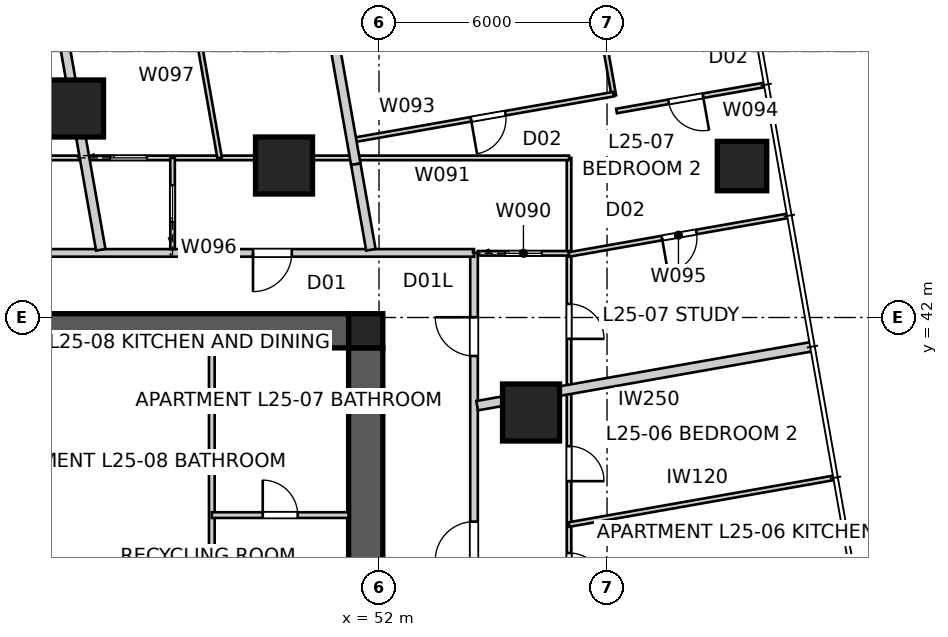
"""IFC4 building model, lengths in metres.
Left out: names, types, materials, properties, quantities, classifications, styles, units other than length and angle.
Written with IfcOpenShell. Run it as: python <this file> out.ifc"""

import sys

from ifc_helpers import new_model, si_unit, direction, frame, frame_2d, origin, origin_2d, place, context, subcontext, project, spatial, polyline, rectangle, outline, extrude, element, fill, save


model = new_model("IFC4")
c1 = context("Model", 3, precision=1e-05, world=origin(), true_north=direction((0.0, 1.0)))
c2 = subcontext(c1, "Body", "Model", "MODEL_VIEW")
j1 = project(units=[si_unit("LENGTHUNIT", "METRE"), si_unit("PLANEANGLEUNIT", "RADIAN")], contexts=[c1])
p1 = place(None, origin())
s1 = spatial("IfcSite", under=j1, at=p1, CompositionType="ELEMENT")
p2 = place(p1, origin())
s2 = spatial("IfcBuilding", under=s1, at=p2, CompositionType="ELEMENT")
p3 = place(p2, frame((0.0, 0.0, 93.0)))
s3 = spatial("IfcBuildingStorey", under=s2, at=p3, CompositionType="ELEMENT", Elevation=93.0)
p4 = place(p3, frame((28.8, 41.65, 0.0), z_axis=(0.0, 0.0, 1.0), x_axis=(1.0, 0.0, 0.0)))
e1 = element("IfcWall", 1, at=p4, inside=s3, PredefinedType="SHEAR", context=c2, shape_type="SweptSolid", body=[
    extrude(outline(polyline([(0.0, -0.45), (22.4, -0.45), (22.4, -0.025), (22.85, -0.025), (22.85, 0.025), (22.4, 0.025), (22.4, 0.45), (0.0, 0.45), (0.0, 0.025), (-0.45, 0.025), (-0.45, -0.025), (0.0, -0.025), (0.0, -0.45)])), origin(), (0.0, 0.0, 1.0), 3.4),
])
p5 = place(p3, frame((51.65, 18.8, 0.0), z_axis=(0.0, 0.0, 1.0), x_axis=(0.0, 1.0, 0.0)))
e2 = element("IfcWall", 2, at=p5, inside=s3, PredefinedType="SHEAR", context=c2, shape_type="SweptSolid", body=[
    extrude(outline(polyline([(0.0, -0.45), (22.4, -0.45), (22.4, -0.025), (22.85, -0.025), (22.85, 0.025), (22.4, 0.025), (22.4, 0.45), (0.0, 0.45), (0.0, 0.025), (-0.45, 0.025), (-0.45, -0.025), (0.0, -0.025), (0.0, -0.45)])), origin(), (0.0, 0.0, 1.0), 3.4),
])
p6 = place(p5, frame((11.14, 0.0, 0.0)))
e3 = element("IfcOpeningElement", 3, at=p6, cuts=e2, PredefinedType="OPENING", context=c2, shape_type="SweptSolid", body=[
    extrude(rectangle(XDim=1.02, YDim=2.4, at=frame_2d((0.51, 1.2))), frame((0.0, 0.46, 0.0), z_axis=(0.0, -1.0, 0.0), x_axis=(1.0, 0.0, 0.0)), (0.0, 0.0, 1.0), 0.92),
])
p7 = place(p3, frame((51.65, 41.65, 0.0), z_axis=(0.0, 0.0, 1.0), x_axis=(1.0, 0.0, 0.0)))
e4 = element("IfcColumn", 4, at=p7, inside=s3, PredefinedType="COLUMN", context=c2, shape_type="SweptSolid", body=[
    extrude(rectangle(XDim=0.9, YDim=0.9, at=origin_2d()), origin(), (0.0, 0.0, 1.0), 3.4),
])
p8 = place(p3, frame((61.552, 45.985, 0.0), z_axis=(0.0, 0.0, 1.0), x_axis=(1.0, 0.0, 0.0)))
e5 = element("IfcColumn", 5, at=p8, inside=s3, PredefinedType="COLUMN", context=c2, shape_type="SweptSolid", body=[
    extrude(rectangle(XDim=1.3, YDim=1.3, at=origin_2d()), origin(), (0.0, 0.0, 1.0), 3.4),
])
for number, where, z_axis, x_axis in (
    (6, (56.0, 39.5, 0.0), (0.0, 0.0, 1.0), (1.0, 0.0, 0.0)),
    (7, (49.5, 46.0, 0.0), (0.0, 0.0, 1.0), (1.0, 0.0, 0.0)),
    (8, (44.0, 47.5, 0.0), (0.0, 0.0, 1.0), (1.0, 0.0, 0.0)),
):
    element("IfcColumn", number, at=place(p3, frame(where, z_axis=z_axis, x_axis=x_axis)), inside=s3, PredefinedType="COLUMN", context=c2, shape_type="SweptSolid", body=[
        extrude(rectangle(XDim=1.5, YDim=1.5, at=origin_2d()), origin(), (0.0, 0.0, 1.0), 3.4),
    ])
p9 = place(p3, frame((54.5, 16.3, 0.0), z_axis=(0.0, 0.0, 1.0), x_axis=(0.0, 1.0, 0.0)))
e9 = element("IfcWall", 9, at=p9, inside=s3, PredefinedType="PARTITIONING", context=c2, shape_type="SweptSolid", body=[
    extrude(rectangle(XDim=27.4, YDim=0.2, at=frame_2d((13.7, 0.0))), origin(), (0.0, 0.0, 1.0), 3.25),
])
p10 = place(p9, frame((19.308, 0.0, 0.0)))
e10 = element("IfcOpeningElement", 10, at=p10, cuts=e9, PredefinedType="OPENING", context=c2, shape_type="SweptSolid", body=[
    extrude(rectangle(XDim=1.02, YDim=2.34, at=frame_2d((0.51, 1.17))), frame((0.0, 0.11, 0.0), z_axis=(0.0, -1.0, 0.0), x_axis=(1.0, 0.0, 0.0)), (0.0, 0.0, 1.0), 0.22),
])
p11 = place(p9, frame((24.687, 0.0, 0.0)))
e11 = element("IfcOpeningElement", 11, at=p11, cuts=e9, PredefinedType="OPENING", context=c2, shape_type="SweptSolid", body=[
    extrude(rectangle(XDim=1.02, YDim=2.1, at=frame_2d((0.51, 1.05))), frame((0.0, 0.11, 0.0), z_axis=(0.0, -1.0, 0.0), x_axis=(1.0, 0.0, 0.0)), (0.0, 0.0, 1.0), 0.22),
])
p12 = place(p9, frame((1.622, 0.0, 0.0)))
e12 = element("IfcOpeningElement", 12, at=p12, cuts=e9, PredefinedType="OPENING", context=c2, shape_type="SweptSolid", body=[
    extrude(rectangle(XDim=1.02, YDim=2.1, at=frame_2d((0.51, 1.05))), frame((0.0, 0.11, 0.0), z_axis=(0.0, -1.0, 0.0), x_axis=(1.0, 0.0, 0.0)), (0.0, 0.0, 1.0), 0.22),
])
p13 = place(p3, frame((54.5, 43.7, 0.0), z_axis=(0.0, 0.0, 1.0), x_axis=(-1.0, 0.0, 0.0)))
e13 = element("IfcWall", 13, at=p13, inside=s3, PredefinedType="PARTITIONING", context=c2, shape_type="SweptSolid", body=[
    extrude(rectangle(XDim=29.0, YDim=0.2, at=frame_2d((14.5, 0.0))), origin(), (0.0, 0.0, 1.0), 3.25),
])
p14 = place(p13, frame((11.951, 0.0, 0.0)))
e14 = element("IfcOpeningElement", 14, at=p14, cuts=e13, PredefinedType="OPENING", context=c2, shape_type="SweptSolid", body=[
    extrude(rectangle(XDim=1.02, YDim=2.34, at=frame_2d((0.51, 1.17))), frame((0.0, 0.11, 0.0), z_axis=(0.0, -1.0, 0.0), x_axis=(1.0, 0.0, 0.0)), (0.0, 0.0, 1.0), 0.22),
])
p15 = place(p13, frame((4.795, 0.0, 0.0)))
e15 = element("IfcOpeningElement", 15, at=p15, cuts=e13, PredefinedType="OPENING", context=c2, shape_type="SweptSolid", body=[
    extrude(rectangle(XDim=1.02, YDim=2.34, at=frame_2d((0.51, 1.17))), frame((0.0, 0.11, 0.0), z_axis=(0.0, -1.0, 0.0), x_axis=(1.0, 0.0, 0.0)), (0.0, 0.0, 1.0), 0.22),
])
p16 = place(p3, frame((63.405, 41.235, 0.0), z_axis=(0.0, 0.0, 1.0), x_axis=(-0.984806596137, -0.173654738504, 0.0)))
e16 = element("IfcWall", 16, at=p16, inside=s3, PredefinedType="PARTITIONING", context=c2, shape_type="SweptSolid", body=[
    extrude(rectangle(XDim=8.958, YDim=0.25, at=frame_2d((4.479, 0.0))), origin(), (0.0, 0.0, 1.0), 3.25),
])
p17 = place(p3, frame((42.552, 55.836, 0.0), z_axis=(0.0, 0.0, 1.0), x_axis=(0.173639677872, -0.984809251718, 0.0)))
e17 = element("IfcWall", 17, at=p17, inside=s3, PredefinedType="PARTITIONING", context=c2, shape_type="SweptSolid", body=[
    extrude(rectangle(XDim=12.24, YDim=0.25, at=frame_2d((6.12, 0.0))), origin(), (0.0, 0.0, 1.0), 3.25),
])
p18 = place(p3, frame((49.62, 56.066, 0.0), z_axis=(0.0, 0.0, 1.0), x_axis=(0.173644522411, -0.984808397525, 0.0)))
e18 = element("IfcWall", 18, at=p18, inside=s3, PredefinedType="PARTITIONING", context=c2, shape_type="SweptSolid", body=[
    extrude(rectangle(XDim=10.188, YDim=0.25, at=frame_2d((5.094, 0.0))), origin(), (0.0, 0.0, 1.0), 2.638),
])
p19 = place(p3, frame((51.389, 46.033, 0.0), z_axis=(0.0, 0.0, 1.0), x_axis=(0.173657387043, -0.984806129106, 0.0)))
e19 = element("IfcWall", 19, at=p19, inside=s3, PredefinedType="PARTITIONING", context=c2, shape_type="SweptSolid", body=[
    extrude(rectangle(XDim=2.286, YDim=0.25, at=frame_2d((1.143, 0.0))), origin(), (0.0, 0.0, 1.0), 3.25),
])
p20 = place(p3, frame((47.6, 41.2, 0.0), z_axis=(0.0, 0.0, 1.0), x_axis=(0.0, -1.0, 0.0)))
e20 = element("IfcWall", 20, at=p20, inside=s3, PredefinedType="SOLIDWALL", context=c2, shape_type="SweptSolid", body=[
    extrude(rectangle(XDim=5.9, YDim=0.15, at=frame_2d((2.95, 0.0))), origin(), (0.0, 0.0, 1.0), 3.25),
])
p21 = place(p3, frame((47.6, 36.8, 0.0), z_axis=(0.0, 0.0, 1.0), x_axis=(1.0, 0.0, 0.0)))
e21 = element("IfcWall", 21, at=p21, inside=s3, PredefinedType="SOLIDWALL", context=c2, shape_type="SweptSolid", body=[
    extrude(rectangle(XDim=3.6, YDim=0.15, at=frame_2d((1.8, 0.0))), origin(), (0.0, 0.0, 1.0), 3.25),
])
p22 = place(p21, frame((1.34, 0.0, 0.0)))
e22 = element("IfcOpeningElement", 22, at=p22, cuts=e21, PredefinedType="OPENING", context=c2, shape_type="SweptSolid", body=[
    extrude(rectangle(XDim=0.92, YDim=2.1, at=frame_2d((0.46, 1.05))), frame((0.0, 0.085, 0.0), z_axis=(0.0, -1.0, 0.0), x_axis=(1.0, 0.0, 0.0)), (0.0, 0.0, 1.0), 0.17),
])
p23 = place(p3, frame((57.0, 46.2, 0.0), z_axis=(0.0, 0.0, 1.0), x_axis=(0.0, -1.0, 0.0)))
e23 = element("IfcWall", 23, at=p23, inside=s3, PredefinedType="PARTITIONING", context=c2, shape_type="SweptSolid", body=[
    extrude(rectangle(XDim=32.4, YDim=0.12, at=frame_2d((16.2, 0.0))), origin(), (0.0, 0.0, 1.0), 2.55),
])
p24 = place(p23, frame((10.396, 0.0, 0.0)))
e24 = element("IfcOpeningElement", 24, at=p24, cuts=e23, PredefinedType="OPENING", context=c2, shape_type="SweptSolid", body=[
    extrude(rectangle(XDim=0.92, YDim=2.34, at=frame_2d((0.46, 1.17))), frame((0.0, 0.07, 0.0), z_axis=(0.0, -1.0, 0.0), x_axis=(1.0, 0.0, 0.0)), (0.0, 0.0, 1.0), 0.14),
])
p25 = place(p23, frame((7.587, 0.0, 0.0)))
e25 = element("IfcOpeningElement", 25, at=p25, cuts=e23, PredefinedType="OPENING", context=c2, shape_type="SweptSolid", body=[
    extrude(rectangle(XDim=0.92, YDim=2.34, at=frame_2d((0.46, 1.17))), frame((0.0, 0.07, 0.0), z_axis=(0.0, -1.0, 0.0), x_axis=(1.0, 0.0, 0.0)), (0.0, 0.0, 1.0), 0.14),
])
p26 = place(p23, frame((3.843, 0.0, 0.0)))
e26 = element("IfcOpeningElement", 26, at=p26, cuts=e23, PredefinedType="OPENING", context=c2, shape_type="SweptSolid", body=[
    extrude(rectangle(XDim=0.92, YDim=2.34, at=frame_2d((0.46, 1.17))), frame((0.0, 0.07, 0.0), z_axis=(0.0, -1.0, 0.0), x_axis=(1.0, 0.0, 0.0)), (0.0, 0.0, 1.0), 0.14),
])
p27 = place(p23, frame((27.988, 0.0, 0.0)))
e27 = element("IfcOpeningElement", 27, at=p27, cuts=e23, PredefinedType="OPENING", context=c2, shape_type="SweptSolid", body=[
    extrude(rectangle(XDim=0.92, YDim=2.34, at=frame_2d((0.46, 1.17))), frame((0.0, 0.07, 0.0), z_axis=(0.0, -1.0, 0.0), x_axis=(1.0, 0.0, 0.0)), (0.0, 0.0, 1.0), 0.14),
])
p28 = place(p23, frame((23.957, 0.0, 0.0)))
e28 = element("IfcOpeningElement", 28, at=p28, cuts=e23, PredefinedType="OPENING", context=c2, shape_type="SweptSolid", body=[
    extrude(rectangle(XDim=0.96, YDim=2.1, at=frame_2d((0.48, 1.05))), frame((0.0, 0.07, 0.0), z_axis=(0.0, -1.0, 0.0), x_axis=(1.0, 0.0, 0.0)), (0.0, 0.0, 1.0), 0.14),
])
p29 = place(p23, frame((21.108, 0.0, 0.0)))
e29 = element("IfcOpeningElement", 29, at=p29, cuts=e23, PredefinedType="OPENING", context=c2, shape_type="SweptSolid", body=[
    extrude(rectangle(XDim=0.96, YDim=2.1, at=frame_2d((0.48, 1.05))), frame((0.0, 0.07, 0.0), z_axis=(0.0, -1.0, 0.0), x_axis=(1.0, 0.0, 0.0)), (0.0, 0.0, 1.0), 0.14),
])
p30 = place(p3, frame((57.0, 36.552, 0.0), z_axis=(0.0, 0.0, 1.0), x_axis=(0.984809234282, 0.173639776761, 0.0)))
e30 = element("IfcWall", 30, at=p30, inside=s3, PredefinedType="PARTITIONING", context=c2, shape_type="SweptSolid", body=[
    extrude(rectangle(XDim=7.081, YDim=0.12, at=frame_2d((3.541, 0.0))), origin(), (0.0, 0.0, 1.0), 3.25),
])
p31 = place(p3, frame((54.6, 43.689, 0.0), z_axis=(0.0, 0.0, 1.0), x_axis=(1.0, 0.0, 0.0)))
e31 = element("IfcWall", 31, at=p31, inside=s3, PredefinedType="PARTITIONING", context=c2, shape_type="SweptSolid", body=[
    extrude(rectangle(XDim=2.4, YDim=0.12, at=frame_2d((1.2, 0.0))), origin(), (0.0, 0.0, 1.0), 3.25),
])
p32 = place(p31, frame((0.72, 0.0, 0.0)))
e32 = element("IfcOpeningElement", 32, at=p32, cuts=e31, PredefinedType="OPENING", context=c2, shape_type="SweptSolid", body=[
    extrude(rectangle(XDim=0.96, YDim=2.1, at=frame_2d((0.48, 1.05))), frame((0.0, 0.07, 0.0), z_axis=(0.0, -1.0, 0.0), x_axis=(1.0, 0.0, 0.0)), (0.0, 0.0, 1.0), 0.14),
])
p33 = place(p3, frame((23.0, 46.2, 0.0), z_axis=(0.0, 0.0, 1.0), x_axis=(1.0, 0.0, 0.0)))
e33 = element("IfcWall", 33, at=p33, inside=s3, PredefinedType="PARTITIONING", context=c2, shape_type="SweptSolid", body=[
    extrude(rectangle(XDim=34.0, YDim=0.12, at=frame_2d((17.0, 0.0))), origin(), (0.0, 0.0, 1.0), 2.55),
])
p34 = place(p33, frame((18.989, 0.0, 0.0)))
e34 = element("IfcOpeningElement", 34, at=p34, cuts=e33, PredefinedType="OPENING", context=c2, shape_type="SweptSolid", body=[
    extrude(rectangle(XDim=0.92, YDim=2.34, at=frame_2d((0.46, 1.17))), frame((0.0, 0.07, 0.0), z_axis=(0.0, -1.0, 0.0), x_axis=(1.0, 0.0, 0.0)), (0.0, 0.0, 1.0), 0.14),
])
p35 = place(p33, frame((1.306, 0.0, 0.0)))
e35 = element("IfcOpeningElement", 35, at=p35, cuts=e33, PredefinedType="OPENING", context=c2, shape_type="SweptSolid", body=[
    extrude(rectangle(XDim=0.92, YDim=2.34, at=frame_2d((0.46, 1.17))), frame((0.0, 0.07, 0.0), z_axis=(0.0, -1.0, 0.0), x_axis=(1.0, 0.0, 0.0)), (0.0, 0.0, 1.0), 0.14),
])
p36 = place(p33, frame((13.884, 0.0, 0.0)))
e36 = element("IfcOpeningElement", 36, at=p36, cuts=e33, PredefinedType="OPENING", context=c2, shape_type="SweptSolid", body=[
    extrude(rectangle(XDim=0.96, YDim=2.1, at=frame_2d((0.48, 1.05))), frame((0.0, 0.07, 0.0), z_axis=(0.0, -1.0, 0.0), x_axis=(1.0, 0.0, 0.0)), (0.0, 0.0, 1.0), 0.14),
])
p37 = place(p33, frame((21.929, 0.0, 0.0)))
e37 = element("IfcOpeningElement", 37, at=p37, cuts=e33, PredefinedType="OPENING", context=c2, shape_type="SweptSolid", body=[
    extrude(rectangle(XDim=0.96, YDim=2.1, at=frame_2d((0.48, 1.05))), frame((0.0, 0.07, 0.0), z_axis=(0.0, -1.0, 0.0), x_axis=(1.0, 0.0, 0.0)), (0.0, 0.0, 1.0), 0.14),
])
p38 = place(p3, frame((57.041, 54.288, 0.0), z_axis=(0.0, 0.0, 1.0), x_axis=(0.173657751636, -0.984806064815, 0.0)))
e38 = element("IfcWall", 38, at=p38, inside=s3, PredefinedType="PARTITIONING", context=c2, shape_type="SweptSolid", body=[
    extrude(rectangle(XDim=6.55, YDim=0.12, at=frame_2d((3.275, 0.0))), origin(), (0.0, 0.0, 1.0), 3.25),
])
p39 = place(p3, frame((58.172, 47.877, 0.0), z_axis=(0.0, 0.0, 1.0), x_axis=(-0.984806372973, -0.173656004074, 0.0)))
e39 = element("IfcWall", 39, at=p39, inside=s3, PredefinedType="PARTITIONING", context=c2, shape_type="SweptSolid", body=[
    extrude(rectangle(XDim=7.0, YDim=0.12, at=frame_2d((3.5, 0.0))), origin(), (0.0, 0.0, 1.0), 3.25),
])
p40 = place(p39, frame((2.89, 0.0, 0.0)))
e40 = element("IfcOpeningElement", 40, at=p40, cuts=e39, PredefinedType="OPENING", context=c2, shape_type="SweptSolid", body=[
    extrude(rectangle(XDim=0.92, YDim=2.34, at=frame_2d((0.46, 1.17))), frame((0.0, 0.07, 0.0), z_axis=(0.0, -1.0, 0.0), x_axis=(1.0, 0.0, 0.0)), (0.0, 0.0, 1.0), 0.14),
])
p41 = place(p3, frame((62.15, 48.122, 0.0), z_axis=(0.0, 0.0, 1.0), x_axis=(-0.984804033163, -0.173669272657, 0.0)))
e41 = element("IfcWall", 41, at=p41, inside=s3, PredefinedType="PARTITIONING", context=c2, shape_type="SweptSolid", body=[
    extrude(rectangle(XDim=3.96, YDim=0.12, at=frame_2d((1.98, 0.0))), origin(), (0.0, 0.0, 1.0), 2.638),
])
p42 = place(p41, frame((1.65, 0.0, 0.0)))
e42 = element("IfcOpeningElement", 42, at=p42, cuts=e41, PredefinedType="OPENING", context=c2, shape_type="SweptSolid", body=[
    extrude(rectangle(XDim=0.92, YDim=2.34, at=frame_2d((0.46, 1.17))), frame((0.0, 0.07, 0.0), z_axis=(0.0, -1.0, 0.0), x_axis=(1.0, 0.0, 0.0)), (0.0, 0.0, 1.0), 0.14),
])
p43 = place(p3, frame((62.758, 44.675, 0.0), z_axis=(0.0, 0.0, 1.0), x_axis=(-0.984810032319, -0.173635250578, 0.0)))
e43 = element("IfcWall", 43, at=p43, inside=s3, PredefinedType="PARTITIONING", context=c2, shape_type="SweptSolid", body=[
    extrude(rectangle(XDim=5.846, YDim=0.12, at=frame_2d((2.923, 0.0))), origin(), (0.0, 0.0, 1.0), 3.25),
])
p44 = place(p43, frame((2.443, 0.0, 0.0)))
e44 = element("IfcOpeningElement", 44, at=p44, cuts=e43, PredefinedType="OPENING", context=c2, shape_type="SweptSolid", body=[
    extrude(rectangle(XDim=0.92, YDim=2.34, at=frame_2d((0.46, 1.17))), frame((0.0, 0.07, 0.0), z_axis=(0.0, -1.0, 0.0), x_axis=(1.0, 0.0, 0.0)), (0.0, 0.0, 1.0), 0.14),
])
p45 = place(p3, frame((46.567, 43.8, 0.0), z_axis=(0.0, 0.0, 1.0), x_axis=(0.0, 1.0, 0.0)))
e45 = element("IfcWall", 45, at=p45, inside=s3, PredefinedType="PARTITIONING", context=c2, shape_type="SweptSolid", body=[
    extrude(rectangle(XDim=2.4, YDim=0.12, at=frame_2d((1.2, 0.0))), origin(), (0.0, 0.0, 1.0), 3.25),
])
p46 = place(p45, frame((0.72, 0.0, 0.0)))
e46 = element("IfcOpeningElement", 46, at=p46, cuts=e45, PredefinedType="OPENING", context=c2, shape_type="SweptSolid", body=[
    extrude(rectangle(XDim=0.96, YDim=2.1, at=frame_2d((0.48, 1.05))), frame((0.0, 0.07, 0.0), z_axis=(0.0, -1.0, 0.0), x_axis=(1.0, 0.0, 0.0)), (0.0, 0.0, 1.0), 0.14),
])
p47 = place(p3, frame((47.805, 46.2, 0.0), z_axis=(0.0, 0.0, 1.0), x_axis=(-0.173653605279, 0.984806795962, 0.0)))
e47 = element("IfcWall", 47, at=p47, inside=s3, PredefinedType="PARTITIONING", context=c2, shape_type="SweptSolid", body=[
    extrude(rectangle(XDim=10.362, YDim=0.12, at=frame_2d((5.181, 0.0))), origin(), (0.0, 0.0, 1.0), 3.25),
])
p48 = place(p47, frame((4.741, 0.0, 0.0)))
e48 = element("IfcOpeningElement", 48, at=p48, cuts=e47, PredefinedType="OPENING", context=c2, shape_type="SweptSolid", body=[
    extrude(rectangle(XDim=0.92, YDim=2.34, at=frame_2d((0.46, 1.17))), frame((0.0, 0.07, 0.0), z_axis=(0.0, -1.0, 0.0), x_axis=(1.0, 0.0, 0.0)), (0.0, 0.0, 1.0), 0.14),
])
p49 = place(p10, origin())
e49 = element("IfcDoor", 49, at=p49, inside=s3, OperationType="SINGLE_SWING_LEFT", PredefinedType="DOOR", context=c2, shape_type="SweptSolid", body=[
    extrude(rectangle(XDim=1.02, YDim=2.34, at=frame_2d((0.51, 1.17))), frame((0.0, 0.025, 0.0), z_axis=(0.0, -1.0, 0.0), x_axis=(1.0, 0.0, 0.0)), (0.0, 0.0, 1.0), 0.05),
])
fill(e10, e49)
p50 = place(p15, origin())
e50 = element("IfcDoor", 50, at=p50, inside=s3, OperationType="SINGLE_SWING_RIGHT", PredefinedType="DOOR", context=c2, shape_type="SweptSolid", body=[
    extrude(rectangle(XDim=1.02, YDim=2.34, at=frame_2d((0.51, 1.17))), frame((0.0, 0.025, 0.0), z_axis=(0.0, -1.0, 0.0), x_axis=(1.0, 0.0, 0.0)), (0.0, 0.0, 1.0), 0.05),
])
fill(e15, e50)
p51 = place(p11, origin())
e51 = element("IfcDoor", 51, at=p51, inside=s3, OperationType="SINGLE_SWING_RIGHT", PredefinedType="DOOR", context=c2, shape_type="SweptSolid", body=[
    extrude(rectangle(XDim=1.02, YDim=2.1, at=frame_2d((0.51, 1.05))), frame((0.0, 0.025, 0.0), z_axis=(0.0, -1.0, 0.0), x_axis=(1.0, 0.0, 0.0)), (0.0, 0.0, 1.0), 0.05),
])
fill(e11, e51)
p52 = place(p22, origin())
e52 = element("IfcDoor", 52, at=p52, inside=s3, OperationType="SINGLE_SWING_LEFT", PredefinedType="DOOR", context=c2, shape_type="SweptSolid", body=[
    extrude(rectangle(XDim=0.92, YDim=2.1, at=frame_2d((0.46, 1.05))), frame((0.0, 0.025, 0.0), z_axis=(0.0, -1.0, 0.0), x_axis=(1.0, 0.0, 0.0)), (0.0, 0.0, 1.0), 0.05),
])
fill(e22, e52)
p53 = place(p24, origin())
e53 = element("IfcDoor", 53, at=p53, inside=s3, OperationType="SINGLE_SWING_RIGHT", PredefinedType="DOOR", context=c2, shape_type="SweptSolid", body=[
    extrude(rectangle(XDim=0.92, YDim=2.34, at=frame_2d((0.46, 1.17))), frame((0.0, 0.025, 0.0), z_axis=(0.0, -1.0, 0.0), x_axis=(1.0, 0.0, 0.0)), (0.0, 0.0, 1.0), 0.05),
])
fill(e24, e53)
p54 = place(p25, origin())
e54 = element("IfcDoor", 54, at=p54, inside=s3, OperationType="SINGLE_SWING_RIGHT", PredefinedType="DOOR", context=c2, shape_type="SweptSolid", body=[
    extrude(rectangle(XDim=0.92, YDim=2.34, at=frame_2d((0.46, 1.17))), frame((0.0, 0.025, 0.0), z_axis=(0.0, -1.0, 0.0), x_axis=(1.0, 0.0, 0.0)), (0.0, 0.0, 1.0), 0.05),
])
fill(e25, e54)
p55 = place(p46, origin())
e55 = element("IfcDoor", 55, at=p55, inside=s3, OperationType="SLIDING_TO_LEFT", PredefinedType="DOOR", context=c2, shape_type="SweptSolid", body=[
    extrude(rectangle(XDim=0.96, YDim=2.1, at=frame_2d((0.48, 1.05))), frame((0.0, 0.025, 0.0), z_axis=(0.0, -1.0, 0.0), x_axis=(1.0, 0.0, 0.0)), (0.0, 0.0, 1.0), 0.05),
])
fill(e46, e55)
p56 = place(p26, origin())
e56 = element("IfcDoor", 56, at=p56, inside=s3, OperationType="SINGLE_SWING_RIGHT", PredefinedType="DOOR", context=c2, shape_type="SweptSolid", body=[
    extrude(rectangle(XDim=0.92, YDim=2.34, at=frame_2d((0.46, 1.17))), frame((0.0, 0.025, 0.0), z_axis=(0.0, -1.0, 0.0), x_axis=(1.0, 0.0, 0.0)), (0.0, 0.0, 1.0), 0.05),
])
fill(e26, e56)
p57 = place(p32, origin())
e57 = element("IfcDoor", 57, at=p57, inside=s3, OperationType="SLIDING_TO_LEFT", PredefinedType="DOOR", context=c2, shape_type="SweptSolid", body=[
    extrude(rectangle(XDim=0.96, YDim=2.1, at=frame_2d((0.48, 1.05))), frame((0.0, 0.025, 0.0), z_axis=(0.0, -1.0, 0.0), x_axis=(1.0, 0.0, 0.0)), (0.0, 0.0, 1.0), 0.05),
])
fill(e32, e57)
p58 = place(p37, origin())
e58 = element("IfcDoor", 58, at=p58, inside=s3, OperationType="SLIDING_TO_LEFT", PredefinedType="DOOR", context=c2, shape_type="SweptSolid", body=[
    extrude(rectangle(XDim=0.96, YDim=2.1, at=frame_2d((0.48, 1.05))), frame((0.0, 0.025, 0.0), z_axis=(0.0, -1.0, 0.0), x_axis=(1.0, 0.0, 0.0)), (0.0, 0.0, 1.0), 0.05),
])
fill(e37, e58)
p59 = place(p44, origin())
e59 = element("IfcDoor", 59, at=p59, inside=s3, OperationType="SINGLE_SWING_RIGHT", PredefinedType="DOOR", context=c2, shape_type="SweptSolid", body=[
    extrude(rectangle(XDim=0.92, YDim=2.34, at=frame_2d((0.46, 1.17))), frame((0.0, 0.025, 0.0), z_axis=(0.0, -1.0, 0.0), x_axis=(1.0, 0.0, 0.0)), (0.0, 0.0, 1.0), 0.05),
])
fill(e44, e59)
p60 = place(p40, origin())
e60 = element("IfcDoor", 60, at=p60, inside=s3, OperationType="SINGLE_SWING_RIGHT", PredefinedType="DOOR", context=c2, shape_type="SweptSolid", body=[
    extrude(rectangle(XDim=0.92, YDim=2.34, at=frame_2d((0.46, 1.17))), frame((0.0, 0.025, 0.0), z_axis=(0.0, -1.0, 0.0), x_axis=(1.0, 0.0, 0.0)), (0.0, 0.0, 1.0), 0.05),
])
fill(e40, e60)
p61 = place(p42, origin())
e61 = element("IfcDoor", 61, at=p61, inside=s3, OperationType="SINGLE_SWING_LEFT", PredefinedType="DOOR", context=c2, shape_type="SweptSolid", body=[
    extrude(rectangle(XDim=0.92, YDim=2.34, at=frame_2d((0.46, 1.17))), frame((0.0, 0.025, 0.0), z_axis=(0.0, -1.0, 0.0), x_axis=(1.0, 0.0, 0.0)), (0.0, 0.0, 1.0), 0.05),
])
fill(e42, e61)
save(model, sys.argv[1])
